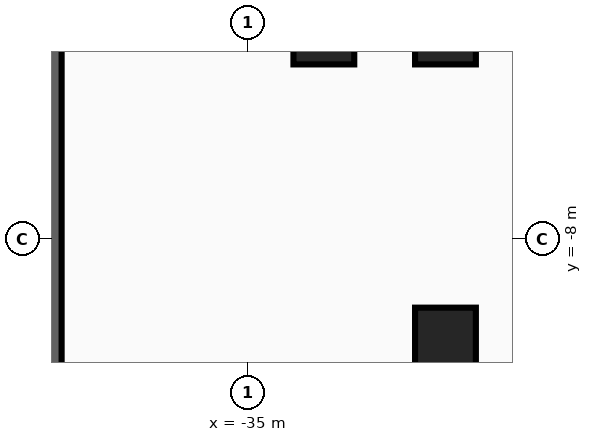
"""IFC4 building model, lengths in metres.
Left out: names, types, materials, properties, quantities, classifications, styles, units other than length and angle.
Written with IfcOpenShell. Run it as: python <this file> out.ifc"""

import sys

from ifc_helpers import new_model, si_unit, direction, frame, frame_2d, origin, origin_2d, place, context, subcontext, project, spatial, rectangle, extrude, source, transform, mapped, element, save


model = new_model("IFC4")
c1 = context("Model", 3, precision=1e-05, world=origin(), true_north=direction((0.0, 1.0)))
c2 = subcontext(c1, "Body", "Model", "MODEL_VIEW")
j1 = project(units=[si_unit("LENGTHUNIT", "METRE"), si_unit("PLANEANGLEUNIT", "RADIAN")], contexts=[c1])
p1 = place(None, origin())
s1 = spatial("IfcSite", under=j1, at=p1, CompositionType="ELEMENT")
p2 = place(p1, origin())
s2 = spatial("IfcBuilding", under=s1, at=p2, CompositionType="ELEMENT")
p3 = place(p2, frame((0.0, 0.0, -9.6)))
s3 = spatial("IfcBuildingStorey", under=s2, at=p3, CompositionType="ELEMENT", Elevation=-9.6)
p4 = place(p3, frame((-40.2, -27.9, 0.0), z_axis=(0.0, 0.0, 1.0), x_axis=(0.0, 1.0, 0.0)))
e1 = element("IfcWall", 1, at=p4, inside=s3, PredefinedType="SOLIDWALL", context=c2, shape_type="SweptSolid", body=[
    extrude(rectangle(XDim=55.8, YDim=0.6, at=frame_2d((27.9, 0.0))), origin(), (0.0, 0.0, 1.0), 4.54),
])
m1 = source(origin(), c2, "Body", "SweptSolid", [
    extrude(rectangle(XDim=1.6, YDim=1.6, at=origin_2d()), origin(), (0.0, 0.0, 1.0), 4.8),
])
for number, where, z_axis, x_axis in (
    (2, (-29.8, -10.6, 0.0), (0.0, 0.0, 1.0), (1.0, 0.0, 0.0)),
    (3, (-29.8, -2.6, 0.0), (0.0, 0.0, 1.0), (1.0, 0.0, 0.0)),
    (4, (-33.0, -2.6, 0.0), (0.0, 0.0, 1.0), (1.0, 0.0, 0.0)),
):
    element("IfcColumn", number, at=place(p3, frame(where, z_axis=z_axis, x_axis=x_axis)), inside=s3, PredefinedType="COLUMN", context=c2, shape_type="MappedRepresentation", body=[
        mapped(m1, transform((0.0, 0.0, 0.0), x_axis=(1.0, 0.0, 0.0), y_axis=(0.0, 1.0, 0.0), z_axis=(0.0, 0.0, 1.0), scale=1.0)),
    ])
save(model, sys.argv[1])
